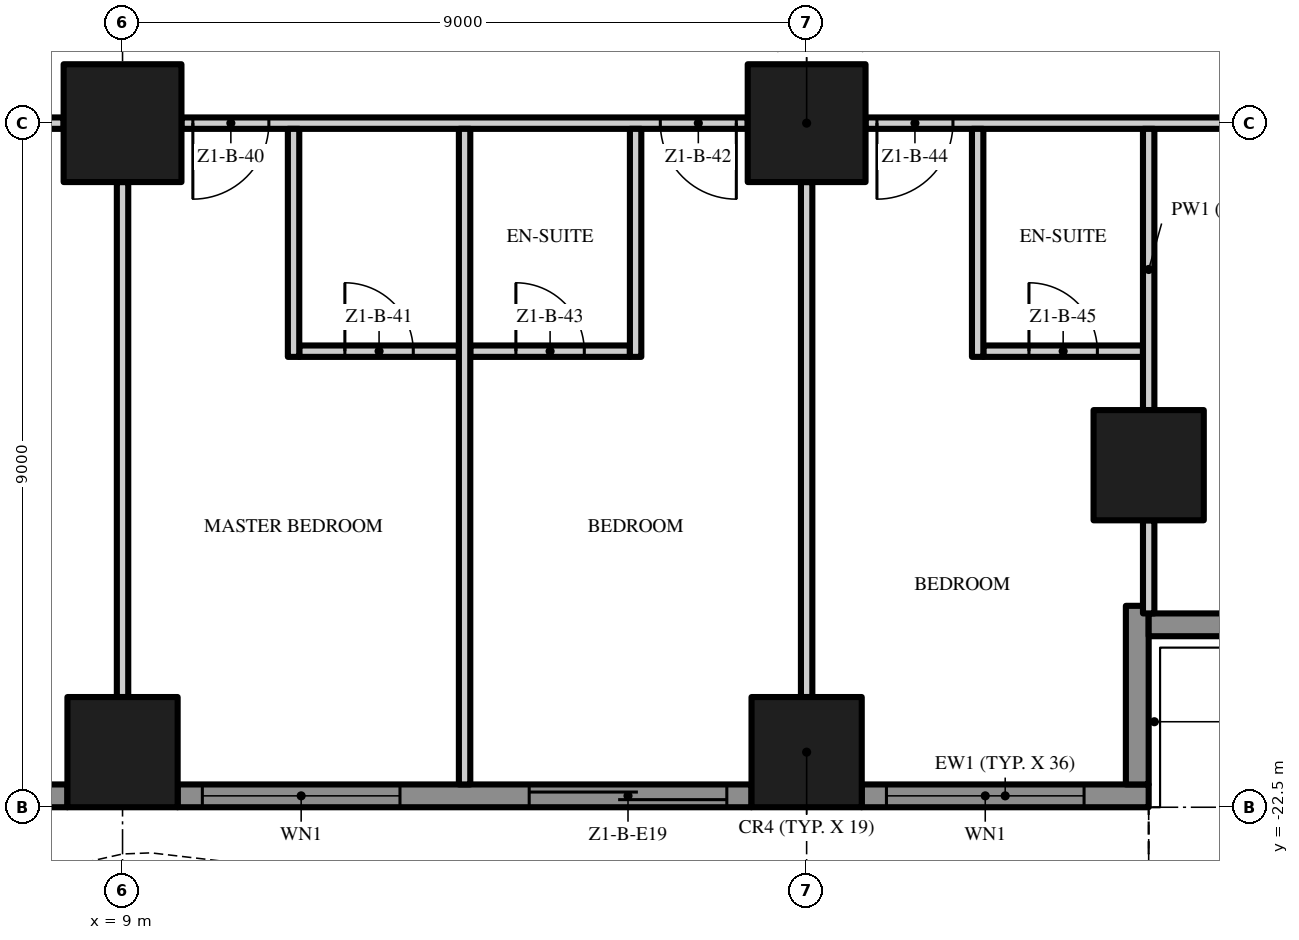
"""IFC4 building model, lengths in metres.
Left out: names, types, materials, properties, quantities, classifications, styles, units other than length and angle.
Written with IfcOpenShell. Run it as: python <this file> out.ifc"""

import sys

from ifc_helpers import new_model, si_unit, direction, frame, frame_2d, origin, origin_2d, place, context, subcontext, project, spatial, polyline, rectangle, outline, extrude, element, fill, save


model = new_model("IFC4")
c1 = context("Model", 3, precision=1e-05, world=origin(), true_north=direction((0.0, 1.0)))
c2 = subcontext(c1, "Body", "Model", "MODEL_VIEW")
j1 = project(units=[si_unit("LENGTHUNIT", "METRE"), si_unit("PLANEANGLEUNIT", "RADIAN")], contexts=[c1])
p1 = place(None, origin())
s1 = spatial("IfcSite", under=j1, at=p1, CompositionType="ELEMENT")
p2 = place(p1, origin())
s2 = spatial("IfcBuilding", under=s1, at=p2, CompositionType="ELEMENT")
p3 = place(p2, frame((0.0, 0.0, 34.0)))
s3 = spatial("IfcBuildingStorey", under=s2, at=p3, CompositionType="ELEMENT", Elevation=34.0)
p4 = place(p3, frame((18.0, -13.5, 0.0), z_axis=(0.0, 0.0, 1.0), x_axis=(1.0, 0.0, 0.0)))
e1 = element("IfcColumn", 1, at=p4, inside=s3, PredefinedType="COLUMN", context=c2, shape_type="SweptSolid", body=[
    extrude(rectangle(XDim=1.55, YDim=1.55, at=origin_2d()), origin(), (0.0, 0.0, 1.0), 3.5),
])
for number, where, z_axis, x_axis in (
    (2, (18.0, -21.775, 0.0), (0.0, 0.0, 1.0), (1.0, 0.0, 0.0)),
    (3, (22.5, -18.0, 0.0), (0.0, 0.0, 1.0), (1.0, 0.0, 0.0)),
):
    element("IfcColumn", number, at=place(p3, frame(where, z_axis=z_axis, x_axis=x_axis)), inside=s3, PredefinedType="COLUMN", context=c2, shape_type="SweptSolid", body=[
        extrude(rectangle(XDim=1.45, YDim=1.45, at=origin_2d()), origin(), (0.0, 0.0, 1.0), 3.5),
    ])
p5 = place(p3, frame((9.0, -13.5, 0.0), z_axis=(0.0, 0.0, 1.0), x_axis=(1.0, 0.0, 0.0)))
e4 = element("IfcColumn", 4, at=p5, inside=s3, PredefinedType="COLUMN", context=c2, shape_type="SweptSolid", body=[
    extrude(rectangle(XDim=1.55, YDim=1.55, at=origin_2d()), origin(), (0.0, 0.0, 1.0), 3.5),
])
p6 = place(p3, frame((9.0, -21.775, 0.0), z_axis=(0.0, 0.0, 1.0), x_axis=(1.0, 0.0, 0.0)))
e5 = element("IfcColumn", 5, at=p6, inside=s3, PredefinedType="COLUMN", context=c2, shape_type="SweptSolid", body=[
    extrude(rectangle(XDim=1.45, YDim=1.45, at=origin_2d()), origin(), (0.0, 0.0, 1.0), 3.5),
])
p7 = place(p3, frame((8.275, -22.35, 0.0), z_axis=(0.0, 0.0, 1.0), x_axis=(-1.0, 0.0, 0.0)))
e6 = element("IfcWall", 6, at=p7, inside=s3, PredefinedType="SOLIDWALL", context=c2, shape_type="SweptSolid", body=[
    extrude(rectangle(XDim=7.55, YDim=0.3, at=frame_2d((3.775, 0.0))), origin(), (0.0, 0.0, 1.0), 3.5),
])
p8 = place(p7, frame((4.625, 0.0, 0.0)))
e7 = element("IfcOpeningElement", 7, at=p8, cuts=e6, PredefinedType="OPENING", context=c2, shape_type="SweptSolid", body=[
    extrude(rectangle(XDim=2.6, YDim=2.4, at=frame_2d((1.3, 1.2))), frame((0.0, 0.16, 0.0), z_axis=(0.0, -1.0, 0.0), x_axis=(1.0, 0.0, 0.0)), (0.0, 0.0, 1.0), 0.32),
])
p9 = place(p7, frame((0.325, 0.0, 0.45)))
e8 = element("IfcOpeningElement", 8, at=p9, cuts=e6, PredefinedType="OPENING", context=c2, shape_type="SweptSolid", body=[
    extrude(rectangle(XDim=2.6, YDim=2.65, at=frame_2d((1.3, 1.325))), frame((0.0, 0.16, 0.0), z_axis=(0.0, -1.0, 0.0), x_axis=(1.0, 0.0, 0.0)), (0.0, 0.0, 1.0), 0.32),
])
p10 = place(p3, frame((17.275, -22.35, 0.0), z_axis=(0.0, 0.0, 1.0), x_axis=(-1.0, 0.0, 0.0)))
e9 = element("IfcWall", 9, at=p10, inside=s3, PredefinedType="SOLIDWALL", context=c2, shape_type="SweptSolid", body=[
    extrude(rectangle(XDim=7.55, YDim=0.3, at=frame_2d((3.775, 0.0))), origin(), (0.0, 0.0, 1.0), 3.5),
])
p11 = place(p10, frame((4.625, 0.0, 0.45)))
e10 = element("IfcOpeningElement", 10, at=p11, cuts=e9, PredefinedType="OPENING", context=c2, shape_type="SweptSolid", body=[
    extrude(rectangle(XDim=2.6, YDim=2.65, at=frame_2d((1.3, 1.325))), frame((0.0, 0.16, 0.0), z_axis=(0.0, -1.0, 0.0), x_axis=(1.0, 0.0, 0.0)), (0.0, 0.0, 1.0), 0.32),
])
p12 = place(p10, frame((0.325, 0.0, 0.0)))
e11 = element("IfcOpeningElement", 11, at=p12, cuts=e9, PredefinedType="OPENING", context=c2, shape_type="SweptSolid", body=[
    extrude(rectangle(XDim=2.6, YDim=2.4, at=frame_2d((1.3, 1.2))), frame((0.0, 0.16, 0.0), z_axis=(0.0, -1.0, 0.0), x_axis=(1.0, 0.0, 0.0)), (0.0, 0.0, 1.0), 0.32),
])
p13 = place(p3, frame((22.5, -22.35, 0.0), z_axis=(0.0, 0.0, 1.0), x_axis=(-1.0, 0.0, 0.0)))
e12 = element("IfcWall", 12, at=p13, inside=s3, PredefinedType="SOLIDWALL", context=c2, shape_type="SweptSolid", body=[
    extrude(rectangle(XDim=3.775, YDim=0.3, at=frame_2d((1.887, 0.0))), origin(), (0.0, 0.0, 1.0), 3.5),
])
p14 = place(p13, frame((0.85, 0.0, 0.45)))
e13 = element("IfcOpeningElement", 13, at=p14, cuts=e12, PredefinedType="OPENING", context=c2, shape_type="SweptSolid", body=[
    extrude(rectangle(XDim=2.6, YDim=2.65, at=frame_2d((1.3, 1.325))), frame((0.0, 0.16, 0.0), z_axis=(0.0, -1.0, 0.0), x_axis=(1.0, 0.0, 0.0)), (0.0, 0.0, 1.0), 0.32),
])
p15 = place(p3, frame((22.35, -19.85, 0.0), z_axis=(0.0, 0.0, 1.0), x_axis=(0.0, -1.0, 0.0)))
e14 = element("IfcWall", 14, at=p15, inside=s3, PredefinedType="SOLIDWALL", context=c2, shape_type="SweptSolid", body=[
    extrude(rectangle(XDim=2.35, YDim=0.3, at=frame_2d((1.175, 0.0))), origin(), (0.0, 0.0, 1.0), 3.5),
])
p16 = place(p3, frame((24.75, -20.1, 0.0), z_axis=(0.0, 0.0, 1.0), x_axis=(-1.0, 0.0, 0.0)))
e15 = element("IfcWall", 15, at=p16, inside=s3, PredefinedType="SOLIDWALL", context=c2, shape_type="SweptSolid", body=[
    extrude(rectangle(XDim=2.25, YDim=0.3, at=frame_2d((1.125, 0.0))), origin(), (0.0, 0.0, 1.0), 3.5),
])
p17 = place(p3, origin())
e16 = element("IfcWall", 16, at=p17, inside=s3, PredefinedType="USERDEFINED", context=c2, shape_type="SweptSolid", body=[
    extrude(outline(polyline([(-22.5, -23.451), (-21.0, -23.115), (-20.625, -23.1), (-19.5, -23.231), (-18.0, -23.755), (-16.5, -24.488), (-15.0, -25.149), (-13.5, -25.485), (-13.125, -25.5), (-12.0, -25.369), (-10.5, -24.845), (-9.0, -24.112), (-7.5, -23.451), (-6.0, -23.115), (-5.625, -23.1), (-4.5, -23.231), (-3.0, -23.755), (-1.5, -24.488), (0.0, -25.149), (1.5, -25.485), (1.875, -25.5), (3.0, -25.369), (4.5, -24.845), (6.0, -24.112), (7.5, -23.451), (9.0, -23.115), (9.375, -23.1), (10.5, -23.231), (12.0, -23.755), (13.5, -24.488), (15.0, -25.149), (16.5, -25.485), (16.875, -25.5), (18.0, -25.369), (19.5, -24.845), (21.0, -24.112), (22.5, -23.451), (22.399, -23.223), (20.895, -23.885), (19.404, -24.614), (17.944, -25.124), (16.865, -25.249), (16.533, -25.236), (15.079, -24.91), (13.605, -24.261), (12.096, -23.524), (10.556, -22.986), (9.385, -22.849), (8.967, -22.866), (7.421, -23.213), (5.895, -23.885), (4.404, -24.614), (2.944, -25.124), (1.865, -25.249), (1.533, -25.236), (0.079, -24.91), (-1.395, -24.261), (-2.904, -23.524), (-4.444, -22.986), (-5.615, -22.849), (-6.033, -22.866), (-7.579, -23.213), (-9.105, -23.885), (-10.596, -24.614), (-12.056, -25.124), (-13.135, -25.249), (-13.467, -25.236), (-14.921, -24.91), (-16.395, -24.261), (-17.904, -23.524), (-19.444, -22.986), (-20.615, -22.849), (-21.033, -22.866), (-22.555, -23.208), (-22.5, -23.451)])), origin(), (0.0, 0.0, 1.0), 0.9),
])
p18 = place(p3, frame((11.325, -16.5, 0.0), z_axis=(0.0, 0.0, 1.0), x_axis=(1.0, 0.0, 0.0)))
e17 = element("IfcWall", 17, at=p18, inside=s3, PredefinedType="PARTITIONING", context=c2, shape_type="SweptSolid", body=[
    extrude(rectangle(XDim=2.1, YDim=0.15, at=frame_2d((1.05, 0.0))), origin(), (0.0, 0.0, 1.0), 3.5),
])
p19 = place(p18, frame((0.6, 0.0, 0.0)))
e18 = element("IfcOpeningElement", 18, at=p19, cuts=e17, PredefinedType="OPENING", context=c2, shape_type="SweptSolid", body=[
    extrude(rectangle(XDim=0.9, YDim=2.1, at=frame_2d((0.45, 1.05))), frame((0.0, 0.085, 0.0), z_axis=(0.0, -1.0, 0.0), x_axis=(1.0, 0.0, 0.0)), (0.0, 0.0, 1.0), 0.17),
])
p20 = place(p3, frame((13.575, -16.5, 0.0), z_axis=(0.0, 0.0, 1.0), x_axis=(1.0, 0.0, 0.0)))
e19 = element("IfcWall", 19, at=p20, inside=s3, PredefinedType="PARTITIONING", context=c2, shape_type="SweptSolid", body=[
    extrude(rectangle(XDim=2.1, YDim=0.15, at=frame_2d((1.05, 0.0))), origin(), (0.0, 0.0, 1.0), 3.5),
])
p21 = place(p20, frame((0.6, 0.0, 0.0)))
e20 = element("IfcOpeningElement", 20, at=p21, cuts=e19, PredefinedType="OPENING", context=c2, shape_type="SweptSolid", body=[
    extrude(rectangle(XDim=0.9, YDim=2.1, at=frame_2d((0.45, 1.05))), frame((0.0, 0.085, 0.0), z_axis=(0.0, -1.0, 0.0), x_axis=(1.0, 0.0, 0.0)), (0.0, 0.0, 1.0), 0.17),
])
p22 = place(p3, frame((20.325, -16.5, 0.0), z_axis=(0.0, 0.0, 1.0), x_axis=(1.0, 0.0, 0.0)))
e21 = element("IfcWall", 21, at=p22, inside=s3, PredefinedType="PARTITIONING", context=c2, shape_type="SweptSolid", body=[
    extrude(rectangle(XDim=2.1, YDim=0.15, at=frame_2d((1.05, 0.0))), origin(), (0.0, 0.0, 1.0), 3.5),
])
p23 = place(p22, frame((0.6, 0.0, 0.0)))
e22 = element("IfcOpeningElement", 22, at=p23, cuts=e21, PredefinedType="OPENING", context=c2, shape_type="SweptSolid", body=[
    extrude(rectangle(XDim=0.9, YDim=2.1, at=frame_2d((0.45, 1.05))), frame((0.0, 0.085, 0.0), z_axis=(0.0, -1.0, 0.0), x_axis=(1.0, 0.0, 0.0)), (0.0, 0.0, 1.0), 0.17),
])
p24 = place(p3, frame((8.225, -13.5, 0.0), z_axis=(0.0, 0.0, 1.0), x_axis=(-1.0, 0.0, 0.0)))
e23 = element("IfcWall", 23, at=p24, inside=s3, PredefinedType="PARTITIONING", context=c2, shape_type="SweptSolid", body=[
    extrude(rectangle(XDim=7.45, YDim=0.15, at=frame_2d((3.725, 0.0))), origin(), (0.0, 0.0, 1.0), 3.5),
])
p25 = place(p24, frame((1.725, 0.0, 0.0)))
e24 = element("IfcOpeningElement", 24, at=p25, cuts=e23, PredefinedType="OPENING", context=c2, shape_type="SweptSolid", body=[
    extrude(rectangle(XDim=1.8, YDim=2.4, at=frame_2d((0.9, 1.2))), frame((0.0, 0.085, 0.0), z_axis=(0.0, -1.0, 0.0), x_axis=(1.0, 0.0, 0.0)), (0.0, 0.0, 1.0), 0.17),
])
p26 = place(p3, frame((17.225, -13.5, 0.0), z_axis=(0.0, 0.0, 1.0), x_axis=(-1.0, 0.0, 0.0)))
e25 = element("IfcWall", 25, at=p26, inside=s3, PredefinedType="PARTITIONING", context=c2, shape_type="SweptSolid", body=[
    extrude(rectangle(XDim=7.45, YDim=0.15, at=frame_2d((3.725, 0.0))), origin(), (0.0, 0.0, 1.0), 3.5),
])
p27 = place(p26, frame((6.3, 0.0, 0.0)))
e26 = element("IfcOpeningElement", 26, at=p27, cuts=e25, PredefinedType="OPENING", context=c2, shape_type="SweptSolid", body=[
    extrude(rectangle(XDim=1.0, YDim=2.4, at=frame_2d((0.5, 1.2))), frame((0.0, 0.085, 0.0), z_axis=(0.0, -1.0, 0.0), x_axis=(1.0, 0.0, 0.0)), (0.0, 0.0, 1.0), 0.17),
])
p28 = place(p26, frame((0.15, 0.0, 0.0)))
e27 = element("IfcOpeningElement", 27, at=p28, cuts=e25, PredefinedType="OPENING", context=c2, shape_type="SweptSolid", body=[
    extrude(rectangle(XDim=1.0, YDim=2.4, at=frame_2d((0.5, 1.2))), frame((0.0, 0.085, 0.0), z_axis=(0.0, -1.0, 0.0), x_axis=(1.0, 0.0, 0.0)), (0.0, 0.0, 1.0), 0.17),
])
p29 = place(p3, frame((25.55, -13.5, 0.0), z_axis=(0.0, 0.0, 1.0), x_axis=(-1.0, 0.0, 0.0)))
e28 = element("IfcWall", 28, at=p29, inside=s3, PredefinedType="PARTITIONING", context=c2, shape_type="SweptSolid", body=[
    extrude(rectangle(XDim=6.775, YDim=0.15, at=frame_2d((3.388, 0.0))), origin(), (0.0, 0.0, 1.0), 3.5),
])
p30 = place(p29, frame((5.625, 0.0, 0.0)))
e29 = element("IfcOpeningElement", 29, at=p30, cuts=e28, PredefinedType="OPENING", context=c2, shape_type="SweptSolid", body=[
    extrude(rectangle(XDim=1.0, YDim=2.4, at=frame_2d((0.5, 1.2))), frame((0.0, 0.085, 0.0), z_axis=(0.0, -1.0, 0.0), x_axis=(1.0, 0.0, 0.0)), (0.0, 0.0, 1.0), 0.17),
])
p31 = place(p29, frame((0.15, 0.0, 0.0)))
e30 = element("IfcOpeningElement", 30, at=p31, cuts=e28, PredefinedType="OPENING", context=c2, shape_type="SweptSolid", body=[
    extrude(rectangle(XDim=1.5, YDim=2.4, at=frame_2d((0.75, 1.2))), frame((0.0, 0.085, 0.0), z_axis=(0.0, -1.0, 0.0), x_axis=(1.0, 0.0, 0.0)), (0.0, 0.0, 1.0), 0.17),
])
p32 = place(p3, frame((9.0, -21.05, 0.0), z_axis=(0.0, 0.0, 1.0), x_axis=(0.0, 1.0, 0.0)))
e31 = element("IfcWall", 31, at=p32, inside=s3, PredefinedType="PARTITIONING", context=c2, shape_type="SweptSolid", body=[
    extrude(rectangle(XDim=6.775, YDim=0.15, at=frame_2d((3.388, 0.0))), origin(), (0.0, 0.0, 1.0), 3.5),
])
p33 = place(p3, frame((11.25, -16.575, 0.0), z_axis=(0.0, 0.0, 1.0), x_axis=(0.0, 1.0, 0.0)))
e32 = element("IfcWall", 32, at=p33, inside=s3, PredefinedType="PARTITIONING", context=c2, shape_type="SweptSolid", body=[
    extrude(rectangle(XDim=3.0, YDim=0.15, at=frame_2d((1.5, 0.0))), origin(), (0.0, 0.0, 1.0), 3.5),
])
p34 = place(p3, frame((13.5, -22.2, 0.0), z_axis=(0.0, 0.0, 1.0), x_axis=(0.0, 1.0, 0.0)))
e33 = element("IfcWall", 33, at=p34, inside=s3, PredefinedType="PARTITIONING", context=c2, shape_type="SweptSolid", body=[
    extrude(rectangle(XDim=8.625, YDim=0.15, at=frame_2d((4.312, 0.0))), origin(), (0.0, 0.0, 1.0), 3.5),
])
p35 = place(p3, frame((15.75, -16.575, 0.0), z_axis=(0.0, 0.0, 1.0), x_axis=(0.0, 1.0, 0.0)))
e34 = element("IfcWall", 34, at=p35, inside=s3, PredefinedType="PARTITIONING", context=c2, shape_type="SweptSolid", body=[
    extrude(rectangle(XDim=3.0, YDim=0.15, at=frame_2d((1.5, 0.0))), origin(), (0.0, 0.0, 1.0), 3.5),
])
p36 = place(p3, frame((18.0, -21.05, 0.0), z_axis=(0.0, 0.0, 1.0), x_axis=(0.0, 1.0, 0.0)))
e35 = element("IfcWall", 35, at=p36, inside=s3, PredefinedType="PARTITIONING", context=c2, shape_type="SweptSolid", body=[
    extrude(rectangle(XDim=6.775, YDim=0.15, at=frame_2d((3.388, 0.0))), origin(), (0.0, 0.0, 1.0), 3.5),
])
p37 = place(p3, frame((20.25, -16.575, 0.0), z_axis=(0.0, 0.0, 1.0), x_axis=(0.0, 1.0, 0.0)))
e36 = element("IfcWall", 36, at=p37, inside=s3, PredefinedType="PARTITIONING", context=c2, shape_type="SweptSolid", body=[
    extrude(rectangle(XDim=3.0, YDim=0.15, at=frame_2d((1.5, 0.0))), origin(), (0.0, 0.0, 1.0), 3.5),
])
p38 = place(p3, frame((22.5, -19.95, 0.0), z_axis=(0.0, 0.0, 1.0), x_axis=(0.0, 1.0, 0.0)))
e37 = element("IfcWall", 37, at=p38, inside=s3, PredefinedType="PARTITIONING", context=c2, shape_type="SweptSolid", body=[
    extrude(rectangle(XDim=1.225, YDim=0.15, at=frame_2d((0.613, 0.0))), origin(), (0.0, 0.0, 1.0), 3.5),
])
p39 = place(p3, frame((22.5, -17.275, 0.0), z_axis=(0.0, 0.0, 1.0), x_axis=(0.0, 1.0, 0.0)))
e38 = element("IfcWall", 38, at=p39, inside=s3, PredefinedType="PARTITIONING", context=c2, shape_type="SweptSolid", body=[
    extrude(rectangle(XDim=3.7, YDim=0.15, at=frame_2d((1.85, 0.0))), origin(), (0.0, 0.0, 1.0), 3.5),
])
p40 = place(p11, origin())
e39 = element("IfcWindow", 39, at=p40, inside=s3, PartitioningType="SINGLE_PANEL", PredefinedType="WINDOW", context=c2, shape_type="SweptSolid", body=[
    extrude(rectangle(XDim=2.6, YDim=2.65, at=frame_2d((1.3, 1.325))), frame((0.0, 0.03, 0.0), z_axis=(0.0, -1.0, 0.0), x_axis=(1.0, 0.0, 0.0)), (0.0, 0.0, 1.0), 0.06),
])
fill(e10, e39)
p41 = place(p12, origin())
e40 = element("IfcDoor", 40, at=p41, inside=s3, OperationType="SINGLE_SWING_LEFT", PredefinedType="DOOR", context=c2, shape_type="SweptSolid", body=[
    extrude(rectangle(XDim=2.6, YDim=2.4, at=frame_2d((1.3, 1.2))), frame((0.0, 0.025, 0.0), z_axis=(0.0, -1.0, 0.0), x_axis=(1.0, 0.0, 0.0)), (0.0, 0.0, 1.0), 0.05),
])
fill(e11, e40)
p42 = place(p14, origin())
e41 = element("IfcWindow", 41, at=p42, inside=s3, PartitioningType="SINGLE_PANEL", PredefinedType="WINDOW", context=c2, shape_type="SweptSolid", body=[
    extrude(rectangle(XDim=2.6, YDim=2.65, at=frame_2d((1.3, 1.325))), frame((0.0, 0.03, 0.0), z_axis=(0.0, -1.0, 0.0), x_axis=(1.0, 0.0, 0.0)), (0.0, 0.0, 1.0), 0.06),
])
fill(e13, e41)
p43 = place(p27, origin())
e42 = element("IfcDoor", 42, at=p43, inside=s3, OperationType="SINGLE_SWING_RIGHT", PredefinedType="DOOR", context=c2, shape_type="SweptSolid", body=[
    extrude(rectangle(XDim=1.0, YDim=2.4, at=frame_2d((0.5, 1.2))), frame((0.0, 0.025, 0.0), z_axis=(0.0, -1.0, 0.0), x_axis=(1.0, 0.0, 0.0)), (0.0, 0.0, 1.0), 0.05),
])
fill(e26, e42)
p44 = place(p19, origin())
e43 = element("IfcDoor", 43, at=p44, inside=s3, OperationType="SINGLE_SWING_LEFT", PredefinedType="DOOR", context=c2, shape_type="SweptSolid", body=[
    extrude(rectangle(XDim=0.9, YDim=2.1, at=frame_2d((0.45, 1.05))), frame((0.0, 0.025, 0.0), z_axis=(0.0, -1.0, 0.0), x_axis=(1.0, 0.0, 0.0)), (0.0, 0.0, 1.0), 0.05),
])
fill(e18, e43)
p45 = place(p28, origin())
e44 = element("IfcDoor", 44, at=p45, inside=s3, OperationType="SINGLE_SWING_LEFT", PredefinedType="DOOR", context=c2, shape_type="SweptSolid", body=[
    extrude(rectangle(XDim=1.0, YDim=2.4, at=frame_2d((0.5, 1.2))), frame((0.0, 0.025, 0.0), z_axis=(0.0, -1.0, 0.0), x_axis=(1.0, 0.0, 0.0)), (0.0, 0.0, 1.0), 0.05),
])
fill(e27, e44)
p46 = place(p21, origin())
e45 = element("IfcDoor", 45, at=p46, inside=s3, OperationType="SINGLE_SWING_LEFT", PredefinedType="DOOR", context=c2, shape_type="SweptSolid", body=[
    extrude(rectangle(XDim=0.9, YDim=2.1, at=frame_2d((0.45, 1.05))), frame((0.0, 0.025, 0.0), z_axis=(0.0, -1.0, 0.0), x_axis=(1.0, 0.0, 0.0)), (0.0, 0.0, 1.0), 0.05),
])
fill(e20, e45)
p47 = place(p30, origin())
e46 = element("IfcDoor", 46, at=p47, inside=s3, OperationType="SINGLE_SWING_RIGHT", PredefinedType="DOOR", context=c2, shape_type="SweptSolid", body=[
    extrude(rectangle(XDim=1.0, YDim=2.4, at=frame_2d((0.5, 1.2))), frame((0.0, 0.025, 0.0), z_axis=(0.0, -1.0, 0.0), x_axis=(1.0, 0.0, 0.0)), (0.0, 0.0, 1.0), 0.05),
])
fill(e29, e46)
p48 = place(p23, origin())
e47 = element("IfcDoor", 47, at=p48, inside=s3, OperationType="SINGLE_SWING_LEFT", PredefinedType="DOOR", context=c2, shape_type="SweptSolid", body=[
    extrude(rectangle(XDim=0.9, YDim=2.1, at=frame_2d((0.45, 1.05))), frame((0.0, 0.025, 0.0), z_axis=(0.0, -1.0, 0.0), x_axis=(1.0, 0.0, 0.0)), (0.0, 0.0, 1.0), 0.05),
])
fill(e22, e47)
save(model, sys.argv[1])
